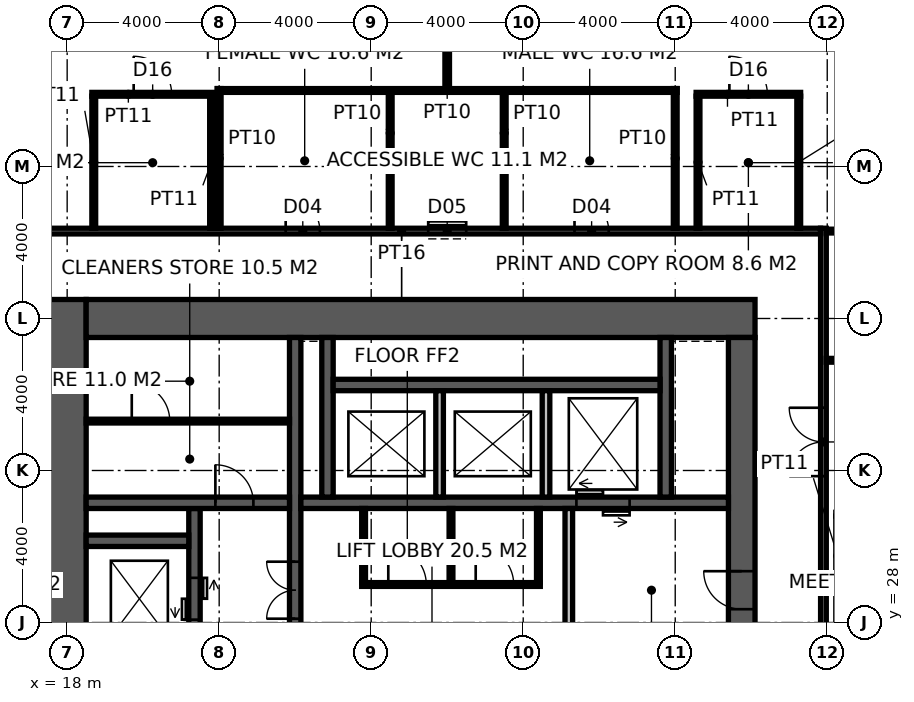
"""IFC4 building model, lengths in metres.
Left out: names, types, materials, properties, quantities, classifications, styles, units other than length and angle.
Written with IfcOpenShell. Run it as: python <this file> out.ifc"""

import sys

from ifc_helpers import new_model, si_unit, direction, frame, frame_2d, origin, place, context, subcontext, project, spatial, rectangle, extrude, element, fill, save


model = new_model("IFC4")
c1 = context("Model", 3, precision=1e-05, world=origin(), true_north=direction((0.0, 1.0)))
c2 = subcontext(c1, "Body", "Model", "MODEL_VIEW")
j1 = project(units=[si_unit("LENGTHUNIT", "METRE"), si_unit("PLANEANGLEUNIT", "RADIAN")], contexts=[c1])
p1 = place(None, origin())
s1 = spatial("IfcSite", under=j1, at=p1, CompositionType="ELEMENT")
p2 = place(p1, origin())
s2 = spatial("IfcBuilding", under=s1, at=p2, CompositionType="ELEMENT")
p3 = place(p2, frame((0.0, 0.0, 93.4)))
s3 = spatial("IfcBuildingStorey", under=s2, at=p3, CompositionType="ELEMENT", Elevation=93.4)
p4 = place(p3, frame((18.0, 17.5, -0.15), z_axis=(0.0, 0.0, 1.0), x_axis=(0.0, 1.0, 0.0)))
e1 = element("IfcWall", 1, at=p4, inside=s3, PredefinedType="SHEAR", context=c2, shape_type="SweptSolid", body=[
    extrude(rectangle(XDim=19.0, YDim=1.0, at=frame_2d((9.5, 0.0))), origin(), (0.0, 0.0, 1.0), 4.0),
])
p5 = place(p3, frame((18.5, 36.0, -0.15), z_axis=(0.0, 0.0, 1.0), x_axis=(1.0, 0.0, 0.0)))
e2 = element("IfcWall", 2, at=p5, inside=s3, PredefinedType="SHEAR", context=c2, shape_type="SweptSolid", body=[
    extrude(rectangle(XDim=17.6, YDim=1.0, at=frame_2d((8.8, 0.0))), origin(), (0.0, 0.0, 1.0), 4.0),
])
p6 = place(p3, frame((35.75, 18.5, -0.15), z_axis=(0.0, 0.0, 1.0), x_axis=(0.0, 1.0, 0.0)))
e3 = element("IfcWall", 3, at=p6, inside=s3, PredefinedType="SHEAR", context=c2, shape_type="SweptSolid", body=[
    extrude(rectangle(XDim=17.0, YDim=0.7, at=frame_2d((8.5, 0.0))), origin(), (0.0, 0.0, 1.0), 4.0),
])
p7 = place(p6, frame((9.85, 0.0, 0.15)))
e4 = element("IfcOpeningElement", 4, at=p7, cuts=e3, PredefinedType="OPENING", context=c2, shape_type="SweptSolid", body=[
    extrude(rectangle(XDim=1.0, YDim=2.2, at=frame_2d((0.5, 1.1))), frame((0.0, 0.36, 0.0), z_axis=(0.0, -1.0, 0.0), x_axis=(1.0, 0.0, 0.0)), (0.0, 0.0, 1.0), 0.72),
])
p8 = place(p3, frame((24.0, 18.5, -0.15), z_axis=(0.0, 0.0, 1.0), x_axis=(0.0, 1.0, 0.0)))
e5 = element("IfcWall", 5, at=p8, inside=s3, PredefinedType="SHEAR", context=c2, shape_type="SweptSolid", body=[
    extrude(rectangle(XDim=17.0, YDim=0.3, at=frame_2d((8.5, 0.0))), origin(), (0.0, 0.0, 1.0), 4.0),
])
p9 = place(p8, frame((9.6, 0.0, 0.15)))
e6 = element("IfcOpeningElement", 6, at=p9, cuts=e5, PredefinedType="OPENING", context=c2, shape_type="SweptSolid", body=[
    extrude(rectangle(XDim=1.5, YDim=2.4, at=frame_2d((0.75, 1.2))), frame((0.0, 0.16, 0.0), z_axis=(0.0, -1.0, 0.0), x_axis=(1.0, 0.0, 0.0)), (0.0, 0.0, 1.0), 0.32),
])
p10 = place(p3, frame((24.15, 31.15, -0.15), z_axis=(0.0, 0.0, 1.0), x_axis=(1.0, 0.0, 0.0)))
e7 = element("IfcWall", 7, at=p10, inside=s3, PredefinedType="SHEAR", context=c2, shape_type="SweptSolid", body=[
    extrude(rectangle(XDim=11.25, YDim=0.3, at=frame_2d((5.625, 0.0))), origin(), (0.0, 0.0, 1.0), 4.0),
])
p11 = place(p10, frame((7.25, 0.0, 0.15)))
e8 = element("IfcOpeningElement", 8, at=p11, cuts=e7, PredefinedType="OPENING", context=c2, shape_type="SweptSolid", body=[
    extrude(rectangle(XDim=1.4, YDim=2.4, at=frame_2d((0.7, 1.2))), frame((0.0, 0.16, 0.0), z_axis=(0.0, -1.0, 0.0), x_axis=(1.0, 0.0, 0.0)), (0.0, 0.0, 1.0), 0.32),
])
p12 = place(p3, frame((21.35, 18.5, -0.15), z_axis=(0.0, 0.0, 1.0), x_axis=(0.0, 1.0, 0.0)))
e9 = element("IfcWall", 9, at=p12, inside=s3, PredefinedType="SHEAR", context=c2, shape_type="SweptSolid", body=[
    extrude(rectangle(XDim=12.5, YDim=0.3, at=frame_2d((6.25, 0.0))), origin(), (0.0, 0.0, 1.0), 4.0),
])
p13 = place(p12, frame((0.875, 0.0, 0.15)))
e10 = element("IfcOpeningElement", 10, at=p13, cuts=e9, PredefinedType="OPENING", context=c2, shape_type="SweptSolid", body=[
    extrude(rectangle(XDim=1.1, YDim=2.2, at=frame_2d((0.55, 1.1))), frame((0.0, 0.16, 0.0), z_axis=(0.0, -1.0, 0.0), x_axis=(1.0, 0.0, 0.0)), (0.0, 0.0, 1.0), 0.32),
])
p14 = place(p12, frame((3.825, 0.0, 0.15)))
e11 = element("IfcOpeningElement", 11, at=p14, cuts=e9, PredefinedType="OPENING", context=c2, shape_type="SweptSolid", body=[
    extrude(rectangle(XDim=1.1, YDim=2.2, at=frame_2d((0.55, 1.1))), frame((0.0, 0.16, 0.0), z_axis=(0.0, -1.0, 0.0), x_axis=(1.0, 0.0, 0.0)), (0.0, 0.0, 1.0), 0.32),
])
p15 = place(p12, frame((6.675, 0.0, 0.15)))
e12 = element("IfcOpeningElement", 12, at=p15, cuts=e9, PredefinedType="OPENING", context=c2, shape_type="SweptSolid", body=[
    extrude(rectangle(XDim=1.1, YDim=2.2, at=frame_2d((0.55, 1.1))), frame((0.0, 0.16, 0.0), z_axis=(0.0, -1.0, 0.0), x_axis=(1.0, 0.0, 0.0)), (0.0, 0.0, 1.0), 0.32),
])
p16 = place(p12, frame((9.575, 0.0, 0.15)))
e13 = element("IfcOpeningElement", 13, at=p16, cuts=e9, PredefinedType="OPENING", context=c2, shape_type="SweptSolid", body=[
    extrude(rectangle(XDim=1.1, YDim=2.2, at=frame_2d((0.55, 1.1))), frame((0.0, 0.16, 0.0), z_axis=(0.0, -1.0, 0.0), x_axis=(1.0, 0.0, 0.0)), (0.0, 0.0, 1.0), 0.32),
])
p17 = place(p3, frame((18.5, 31.15, -0.15), z_axis=(0.0, 0.0, 1.0), x_axis=(1.0, 0.0, 0.0)))
e14 = element("IfcWall", 14, at=p17, inside=s3, PredefinedType="SHEAR", context=c2, shape_type="SweptSolid", body=[
    extrude(rectangle(XDim=5.35, YDim=0.3, at=frame_2d((2.675, 0.0))), origin(), (0.0, 0.0, 1.0), 4.0),
])
p18 = place(p17, frame((3.4, 0.0, 0.15)))
e15 = element("IfcOpeningElement", 15, at=p18, cuts=e14, PredefinedType="OPENING", context=c2, shape_type="SweptSolid", body=[
    extrude(rectangle(XDim=1.0, YDim=2.2, at=frame_2d((0.5, 1.1))), frame((0.0, 0.16, 0.0), z_axis=(0.0, -1.0, 0.0), x_axis=(1.0, 0.0, 0.0)), (0.0, 0.0, 1.0), 0.32),
])
p19 = place(p3, frame((18.5, 30.15, -0.15), z_axis=(0.0, 0.0, 1.0), x_axis=(1.0, 0.0, 0.0)))
e16 = element("IfcWall", 16, at=p19, inside=s3, PredefinedType="SHEAR", context=c2, shape_type="SweptSolid", body=[
    extrude(rectangle(XDim=2.7, YDim=0.3, at=frame_2d((1.35, 0.0))), origin(), (0.0, 0.0, 1.0), 4.0),
])
for number, where, z_axis, x_axis in (
    (17, (24.85, 31.3, -0.15), (0.0, 0.0, 1.0), (0.0, 1.0, 0.0)),
    (18, (33.75, 31.3, -0.15), (0.0, 0.0, 1.0), (0.0, 1.0, 0.0)),
):
    element("IfcWall", number, at=place(p3, frame(where, z_axis=z_axis, x_axis=x_axis)), inside=s3, PredefinedType="SHEAR", context=c2, shape_type="SweptSolid", body=[
        extrude(rectangle(XDim=4.2, YDim=0.3, at=frame_2d((2.1, 0.0))), origin(), (0.0, 0.0, 1.0), 4.0),
    ])
p20 = place(p3, frame((25.0, 34.25, -0.15), z_axis=(0.0, 0.0, 1.0), x_axis=(1.0, 0.0, 0.0)))
e19 = element("IfcWall", 19, at=p20, inside=s3, PredefinedType="SHEAR", context=c2, shape_type="SweptSolid", body=[
    extrude(rectangle(XDim=8.6, YDim=0.3, at=frame_2d((4.3, 0.0))), origin(), (0.0, 0.0, 1.0), 4.0),
])
for number, where, z_axis, x_axis in (
    (20, (27.8, 31.3, -0.15), (0.0, 0.0, 1.0), (0.0, 1.0, 0.0)),
    (21, (30.6, 31.3, -0.15), (0.0, 0.0, 1.0), (0.0, 1.0, 0.0)),
):
    element("IfcWall", number, at=place(p3, frame(where, z_axis=z_axis, x_axis=x_axis)), inside=s3, PredefinedType="SOLIDWALL", context=c2, shape_type="SweptSolid", body=[
        extrude(rectangle(XDim=2.8, YDim=0.2, at=frame_2d((1.4, 0.0))), origin(), (0.0, 0.0, 1.0), 4.0),
    ])
p21 = place(p3, frame((31.2, 26.7, 0.0), z_axis=(0.0, 0.0, 1.0), x_axis=(0.0, 1.0, 0.0)))
e22 = element("IfcWall", 22, at=p21, inside=s3, PredefinedType="SOLIDWALL", context=c2, shape_type="SweptSolid", body=[
    extrude(rectangle(XDim=4.3, YDim=0.2, at=frame_2d((2.15, 0.0))), origin(), (0.0, 0.0, 1.0), 3.85),
])
p22 = place(p3, frame((18.5, 33.3, 0.0), z_axis=(0.0, 0.0, 1.0), x_axis=(1.0, 0.0, 0.0)))
e23 = element("IfcWall", 23, at=p22, inside=s3, PredefinedType="PARTITIONING", context=c2, shape_type="SweptSolid", body=[
    extrude(rectangle(XDim=5.35, YDim=0.1, at=frame_2d((2.675, 0.0))), origin(), (0.0, 0.0, 1.0), 3.85),
])
p23 = place(p22, frame((1.2, 0.0, 0.0)))
e24 = element("IfcOpeningElement", 24, at=p23, cuts=e23, PredefinedType="OPENING", context=c2, shape_type="SweptSolid", body=[
    extrude(rectangle(XDim=1.0, YDim=2.2, at=frame_2d((0.5, 1.1))), frame((0.0, 0.06, 0.0), z_axis=(0.0, -1.0, 0.0), x_axis=(1.0, 0.0, 0.0)), (0.0, 0.0, 1.0), 0.12),
])
p24 = place(p3, frame((25.75, 29.0, 0.0), z_axis=(0.0, 0.0, 1.0), x_axis=(1.0, 0.0, 0.0)))
e25 = element("IfcWall", 25, at=p24, inside=s3, PredefinedType="PARTITIONING", context=c2, shape_type="SweptSolid", body=[
    extrude(rectangle(XDim=4.7, YDim=0.1, at=frame_2d((2.35, 0.0))), origin(), (0.0, 0.0, 1.0), 3.85),
])
p25 = place(p24, frame((0.7, 0.0, 0.0)))
e26 = element("IfcOpeningElement", 26, at=p25, cuts=e25, PredefinedType="OPENING", context=c2, shape_type="SweptSolid", body=[
    extrude(rectangle(XDim=1.0, YDim=2.2, at=frame_2d((0.5, 1.1))), frame((0.0, 0.06, 0.0), z_axis=(0.0, -1.0, 0.0), x_axis=(1.0, 0.0, 0.0)), (0.0, 0.0, 1.0), 0.12),
])
p26 = place(p24, frame((3.0, 0.0, 0.0)))
e27 = element("IfcOpeningElement", 27, at=p26, cuts=e25, PredefinedType="OPENING", context=c2, shape_type="SweptSolid", body=[
    extrude(rectangle(XDim=1.0, YDim=2.2, at=frame_2d((0.5, 1.1))), frame((0.0, 0.06, 0.0), z_axis=(0.0, -1.0, 0.0), x_axis=(1.0, 0.0, 0.0)), (0.0, 0.0, 1.0), 0.12),
])
for number, where, z_axis, x_axis in (
    (28, (25.8, 29.05, 0.0), (0.0, 0.0, 1.0), (0.0, 1.0, 0.0)),
    (29, (30.4, 29.05, 0.0), (0.0, 0.0, 1.0), (0.0, 1.0, 0.0)),
    (30, (28.1, 29.05, 0.0), (0.0, 0.0, 1.0), (0.0, 1.0, 0.0)),
):
    element("IfcWall", number, at=place(p3, frame(where, z_axis=z_axis, x_axis=x_axis)), inside=s3, PredefinedType="PARTITIONING", context=c2, shape_type="SweptSolid", body=[
        extrude(rectangle(XDim=1.95, YDim=0.1, at=frame_2d((0.975, 0.0))), origin(), (0.0, 0.0, 1.0), 3.85),
    ])
p27 = place(p3, frame((37.9, 15.625, 0.0), z_axis=(0.0, 0.0, 1.0), x_axis=(0.0, 1.0, 0.0)))
e31 = element("IfcWall", 31, at=p27, inside=s3, PredefinedType="PARTITIONING", context=c2, shape_type="SweptSolid", body=[
    extrude(rectangle(XDim=22.75, YDim=0.15, at=frame_2d((11.375, 0.0))), origin(), (0.0, 0.0, 1.0), 2.95),
])
p28 = place(p27, frame((4.974, 0.0, 0.0)))
e32 = element("IfcOpeningElement", 32, at=p28, cuts=e31, PredefinedType="OPENING", context=c2, shape_type="SweptSolid", body=[
    extrude(rectangle(XDim=1.8, YDim=2.4, at=frame_2d((0.9, 1.2))), frame((0.0, 0.085, 0.0), z_axis=(0.0, -1.0, 0.0), x_axis=(1.0, 0.0, 0.0)), (0.0, 0.0, 1.0), 0.17),
])
p29 = place(p27, frame((16.226, 0.0, 0.0)))
e33 = element("IfcOpeningElement", 33, at=p29, cuts=e31, PredefinedType="OPENING", context=c2, shape_type="SweptSolid", body=[
    extrude(rectangle(XDim=1.8, YDim=2.4, at=frame_2d((0.9, 1.2))), frame((0.0, 0.085, 0.0), z_axis=(0.0, -1.0, 0.0), x_axis=(1.0, 0.0, 0.0)), (0.0, 0.0, 1.0), 0.17),
])
p30 = place(p3, frame((15.775, 38.3, 0.0), z_axis=(0.0, 0.0, 1.0), x_axis=(1.0, 0.0, 0.0)))
e34 = element("IfcWall", 34, at=p30, inside=s3, PredefinedType="PARTITIONING", context=c2, shape_type="SweptSolid", body=[
    extrude(rectangle(XDim=22.05, YDim=0.15, at=frame_2d((11.025, 0.0))), origin(), (0.0, 0.0, 1.0), 3.85),
])
p31 = place(p30, frame((7.975, 0.0, 0.0)))
e35 = element("IfcOpeningElement", 35, at=p31, cuts=e34, PredefinedType="OPENING", context=c2, shape_type="SweptSolid", body=[
    extrude(rectangle(XDim=0.9, YDim=2.1, at=frame_2d((0.45, 1.05))), frame((0.0, 0.085, 0.0), z_axis=(0.0, -1.0, 0.0), x_axis=(1.0, 0.0, 0.0)), (0.0, 0.0, 1.0), 0.17),
])
p32 = place(p30, frame((11.725, 0.0, 0.0)))
e36 = element("IfcOpeningElement", 36, at=p32, cuts=e34, PredefinedType="OPENING", context=c2, shape_type="SweptSolid", body=[
    extrude(rectangle(XDim=1.0, YDim=2.1, at=frame_2d((0.5, 1.05))), frame((0.0, 0.085, 0.0), z_axis=(0.0, -1.0, 0.0), x_axis=(1.0, 0.0, 0.0)), (0.0, 0.0, 1.0), 0.17),
])
p33 = place(p30, frame((15.575, 0.0, 0.0)))
e37 = element("IfcOpeningElement", 37, at=p33, cuts=e34, PredefinedType="OPENING", context=c2, shape_type="SweptSolid", body=[
    extrude(rectangle(XDim=0.9, YDim=2.1, at=frame_2d((0.45, 1.05))), frame((0.0, 0.085, 0.0), z_axis=(0.0, -1.0, 0.0), x_axis=(1.0, 0.0, 0.0)), (0.0, 0.0, 1.0), 0.17),
])
for number, where, z_axis, x_axis in (
    (38, (22.0, 38.375, 0.0), (0.0, 0.0, 1.0), (0.0, 1.0, 0.0)),
    (39, (34.0, 38.375, 0.0), (0.0, 0.0, 1.0), (0.0, 1.0, 0.0)),
):
    element("IfcWall", number, at=place(p3, frame(where, z_axis=z_axis, x_axis=x_axis)), inside=s3, PredefinedType="PARTITIONING", context=c2, shape_type="SweptSolid", body=[
        extrude(rectangle(XDim=3.675, YDim=0.1, at=frame_2d((1.837, 0.0))), origin(), (0.0, 0.0, 1.0), 2.95),
    ])
p34 = place(p3, frame((21.95, 42.0, 0.0), z_axis=(0.0, 0.0, 1.0), x_axis=(1.0, 0.0, 0.0)))
e40 = element("IfcWall", 40, at=p34, inside=s3, PredefinedType="PARTITIONING", context=c2, shape_type="SweptSolid", body=[
    extrude(rectangle(XDim=12.1, YDim=0.1, at=frame_2d((6.05, 0.0))), origin(), (0.0, 0.0, 1.0), 3.85),
])
for number, where, z_axis, x_axis in (
    (41, (26.5, 38.375, 0.0), (0.0, 0.0, 1.0), (0.0, 1.0, 0.0)),
    (42, (29.5, 38.375, 0.0), (0.0, 0.0, 1.0), (0.0, 1.0, 0.0)),
):
    element("IfcWall", number, at=place(p3, frame(where, z_axis=z_axis, x_axis=x_axis)), inside=s3, PredefinedType="PARTITIONING", context=c2, shape_type="SweptSolid", body=[
        extrude(rectangle(XDim=3.575, YDim=0.1, at=frame_2d((1.788, 0.0))), origin(), (0.0, 0.0, 1.0), 3.85),
    ])
p35 = place(p3, frame((28.0, 42.05, 0.0), z_axis=(0.0, 0.0, 1.0), x_axis=(0.0, 1.0, 0.0)))
e43 = element("IfcWall", 43, at=p35, inside=s3, PredefinedType="PARTITIONING", context=c2, shape_type="SweptSolid", body=[
    extrude(rectangle(XDim=5.65, YDim=0.12, at=frame_2d((2.825, 0.0))), origin(), (0.0, 0.0, 1.0), 3.85),
])
for number, where, z_axis, x_axis in (
    (44, (37.975, 34.9, 0.0), (0.0, 0.0, 1.0), (1.0, 0.0, 0.0)),
    (45, (37.975, 38.3, 0.0), (0.0, 0.0, 1.0), (1.0, 0.0, 0.0)),
):
    element("IfcWall", number, at=place(p3, frame(where, z_axis=z_axis, x_axis=x_axis)), inside=s3, PredefinedType="PARTITIONING", context=c2, shape_type="SweptSolid", body=[
        extrude(rectangle(XDim=4.775, YDim=0.1, at=frame_2d((2.387, 0.0))), origin(), (0.0, 0.0, 1.0), 3.85),
    ])
p36 = place(p3, frame((18.65, 41.9, 0.0), z_axis=(0.0, 0.0, 1.0), x_axis=(1.0, 0.0, 0.0)))
e46 = element("IfcWall", 46, at=p36, inside=s3, PredefinedType="PARTITIONING", context=c2, shape_type="SweptSolid", body=[
    extrude(rectangle(XDim=3.2, YDim=0.1, at=frame_2d((1.6, 0.0))), origin(), (0.0, 0.0, 1.0), 3.85),
])
p37 = place(p36, frame((1.1, 0.0, 0.0)))
e47 = element("IfcOpeningElement", 47, at=p37, cuts=e46, PredefinedType="OPENING", context=c2, shape_type="SweptSolid", body=[
    extrude(rectangle(XDim=1.0, YDim=2.2, at=frame_2d((0.5, 1.1))), frame((0.0, 0.06, 0.0), z_axis=(0.0, -1.0, 0.0), x_axis=(1.0, 0.0, 0.0)), (0.0, 0.0, 1.0), 0.12),
])
p38 = place(p3, frame((34.55, 41.9, 0.0), z_axis=(0.0, 0.0, 1.0), x_axis=(1.0, 0.0, 0.0)))
e48 = element("IfcWall", 48, at=p38, inside=s3, PredefinedType="PARTITIONING", context=c2, shape_type="SweptSolid", body=[
    extrude(rectangle(XDim=2.75, YDim=0.1, at=frame_2d((1.375, 0.0))), origin(), (0.0, 0.0, 1.0), 3.85),
])
p39 = place(p38, frame((0.875, 0.0, 0.0)))
e49 = element("IfcOpeningElement", 49, at=p39, cuts=e48, PredefinedType="OPENING", context=c2, shape_type="SweptSolid", body=[
    extrude(rectangle(XDim=1.0, YDim=2.2, at=frame_2d((0.5, 1.1))), frame((0.0, 0.06, 0.0), z_axis=(0.0, -1.0, 0.0), x_axis=(1.0, 0.0, 0.0)), (0.0, 0.0, 1.0), 0.12),
])
for number, where, z_axis, x_axis in (
    (50, (18.7, 38.375, 0.0), (0.0, 0.0, 1.0), (0.0, 1.0, 0.0)),
    (51, (21.8, 38.375, 0.0), (0.0, 0.0, 1.0), (0.0, 1.0, 0.0)),
    (52, (34.6, 38.375, 0.0), (0.0, 0.0, 1.0), (0.0, 1.0, 0.0)),
    (53, (37.25, 38.375, 0.0), (0.0, 0.0, 1.0), (0.0, 1.0, 0.0)),
):
    element("IfcWall", number, at=place(p3, frame(where, z_axis=z_axis, x_axis=x_axis)), inside=s3, PredefinedType="PARTITIONING", context=c2, shape_type="SweptSolid", body=[
        extrude(rectangle(XDim=3.475, YDim=0.1, at=frame_2d((1.738, 0.0))), origin(), (0.0, 0.0, 1.0), 3.85),
    ])
p40 = place(p7, origin())
e54 = element("IfcDoor", 54, at=p40, inside=s3, OperationType="SINGLE_SWING_RIGHT", PredefinedType="DOOR", context=c2, shape_type="SweptSolid", body=[
    extrude(rectangle(XDim=1.0, YDim=2.2, at=frame_2d((0.5, 1.1))), frame((0.0, 0.025, 0.0), z_axis=(0.0, -1.0, 0.0), x_axis=(1.0, 0.0, 0.0)), (0.0, 0.0, 1.0), 0.05),
])
fill(e4, e54)
p41 = place(p9, origin())
e55 = element("IfcDoor", 55, at=p41, inside=s3, OperationType="DOUBLE_DOOR_DOUBLE_SWING", PredefinedType="DOOR", context=c2, shape_type="SweptSolid", body=[
    extrude(rectangle(XDim=1.5, YDim=2.4, at=frame_2d((0.75, 1.2))), frame((0.0, 0.025, 0.0), z_axis=(0.0, -1.0, 0.0), x_axis=(1.0, 0.0, 0.0)), (0.0, 0.0, 1.0), 0.05),
])
fill(e6, e55)
p42 = place(p18, origin())
e56 = element("IfcDoor", 56, at=p42, inside=s3, OperationType="SINGLE_SWING_LEFT", PredefinedType="DOOR", context=c2, shape_type="SweptSolid", body=[
    extrude(rectangle(XDim=1.0, YDim=2.2, at=frame_2d((0.5, 1.1))), frame((0.0, 0.025, 0.0), z_axis=(0.0, -1.0, 0.0), x_axis=(1.0, 0.0, 0.0)), (0.0, 0.0, 1.0), 0.05),
])
fill(e15, e56)
p43 = place(p23, origin())
e57 = element("IfcDoor", 57, at=p43, inside=s3, OperationType="SINGLE_SWING_LEFT", PredefinedType="DOOR", context=c2, shape_type="SweptSolid", body=[
    extrude(rectangle(XDim=1.0, YDim=2.2, at=frame_2d((0.5, 1.1))), frame((0.0, 0.025, 0.0), z_axis=(0.0, -1.0, 0.0), x_axis=(1.0, 0.0, 0.0)), (0.0, 0.0, 1.0), 0.05),
])
fill(e24, e57)
p44 = place(p25, origin())
e58 = element("IfcDoor", 58, at=p44, inside=s3, OperationType="SINGLE_SWING_LEFT", PredefinedType="DOOR", context=c2, shape_type="SweptSolid", body=[
    extrude(rectangle(XDim=1.0, YDim=2.2, at=frame_2d((0.5, 1.1))), frame((0.0, 0.025, 0.0), z_axis=(0.0, -1.0, 0.0), x_axis=(1.0, 0.0, 0.0)), (0.0, 0.0, 1.0), 0.05),
])
fill(e26, e58)
p45 = place(p26, origin())
e59 = element("IfcDoor", 59, at=p45, inside=s3, OperationType="SINGLE_SWING_LEFT", PredefinedType="DOOR", context=c2, shape_type="SweptSolid", body=[
    extrude(rectangle(XDim=1.0, YDim=2.2, at=frame_2d((0.5, 1.1))), frame((0.0, 0.025, 0.0), z_axis=(0.0, -1.0, 0.0), x_axis=(1.0, 0.0, 0.0)), (0.0, 0.0, 1.0), 0.05),
])
fill(e27, e59)
p46 = place(p31, origin())
e60 = element("IfcDoor", 60, at=p46, inside=s3, OperationType="SINGLE_SWING_LEFT", PredefinedType="DOOR", context=c2, shape_type="SweptSolid", body=[
    extrude(rectangle(XDim=0.9, YDim=2.1, at=frame_2d((0.45, 1.05))), frame((0.0, 0.025, 0.0), z_axis=(0.0, -1.0, 0.0), x_axis=(1.0, 0.0, 0.0)), (0.0, 0.0, 1.0), 0.05),
])
fill(e35, e60)
p47 = place(p32, origin())
e61 = element("IfcDoor", 61, at=p47, inside=s3, OperationType="SLIDING_TO_LEFT", PredefinedType="DOOR", context=c2, shape_type="SweptSolid", body=[
    extrude(rectangle(XDim=1.0, YDim=2.1, at=frame_2d((0.5, 1.05))), frame((0.0, 0.025, 0.0), z_axis=(0.0, -1.0, 0.0), x_axis=(1.0, 0.0, 0.0)), (0.0, 0.0, 1.0), 0.05),
])
fill(e36, e61)
p48 = place(p33, origin())
e62 = element("IfcDoor", 62, at=p48, inside=s3, OperationType="SINGLE_SWING_LEFT", PredefinedType="DOOR", context=c2, shape_type="SweptSolid", body=[
    extrude(rectangle(XDim=0.9, YDim=2.1, at=frame_2d((0.45, 1.05))), frame((0.0, 0.025, 0.0), z_axis=(0.0, -1.0, 0.0), x_axis=(1.0, 0.0, 0.0)), (0.0, 0.0, 1.0), 0.05),
])
fill(e37, e62)
p49 = place(p29, origin())
e63 = element("IfcDoor", 63, at=p49, inside=s3, OperationType="DOUBLE_DOOR_DOUBLE_SWING", PredefinedType="DOOR", context=c2, shape_type="SweptSolid", body=[
    extrude(rectangle(XDim=1.8, YDim=2.4, at=frame_2d((0.9, 1.2))), frame((0.0, 0.025, 0.0), z_axis=(0.0, -1.0, 0.0), x_axis=(1.0, 0.0, 0.0)), (0.0, 0.0, 1.0), 0.05),
])
fill(e33, e63)
p50 = place(p37, origin())
e64 = element("IfcDoor", 64, at=p50, inside=s3, OperationType="SINGLE_SWING_LEFT", PredefinedType="DOOR", context=c2, shape_type="SweptSolid", body=[
    extrude(rectangle(XDim=1.0, YDim=2.2, at=frame_2d((0.5, 1.1))), frame((0.0, 0.025, 0.0), z_axis=(0.0, -1.0, 0.0), x_axis=(1.0, 0.0, 0.0)), (0.0, 0.0, 1.0), 0.05),
])
fill(e47, e64)
p51 = place(p39, origin())
e65 = element("IfcDoor", 65, at=p51, inside=s3, OperationType="SINGLE_SWING_LEFT", PredefinedType="DOOR", context=c2, shape_type="SweptSolid", body=[
    extrude(rectangle(XDim=1.0, YDim=2.2, at=frame_2d((0.5, 1.1))), frame((0.0, 0.025, 0.0), z_axis=(0.0, -1.0, 0.0), x_axis=(1.0, 0.0, 0.0)), (0.0, 0.0, 1.0), 0.05),
])
fill(e49, e65)
p52 = place(p11, origin())
e66 = element("IfcDoor", 66, at=p52, inside=s3, OperationType="DOUBLE_DOOR_SLIDING", PredefinedType="DOOR", context=c2, shape_type="SweptSolid", body=[
    extrude(rectangle(XDim=1.4, YDim=2.4, at=frame_2d((0.7, 1.2))), frame((0.0, 0.025, 0.0), z_axis=(0.0, -1.0, 0.0), x_axis=(1.0, 0.0, 0.0)), (0.0, 0.0, 1.0), 0.05),
])
fill(e8, e66)
p53 = place(p16, origin())
e67 = element("IfcDoor", 67, at=p53, inside=s3, OperationType="DOUBLE_DOOR_SLIDING", PredefinedType="DOOR", context=c2, shape_type="SweptSolid", body=[
    extrude(rectangle(XDim=1.1, YDim=2.2, at=frame_2d((0.55, 1.1))), frame((0.0, 0.025, 0.0), z_axis=(0.0, -1.0, 0.0), x_axis=(1.0, 0.0, 0.0)), (0.0, 0.0, 1.0), 0.05),
])
fill(e13, e67)
save(model, sys.argv[1])
